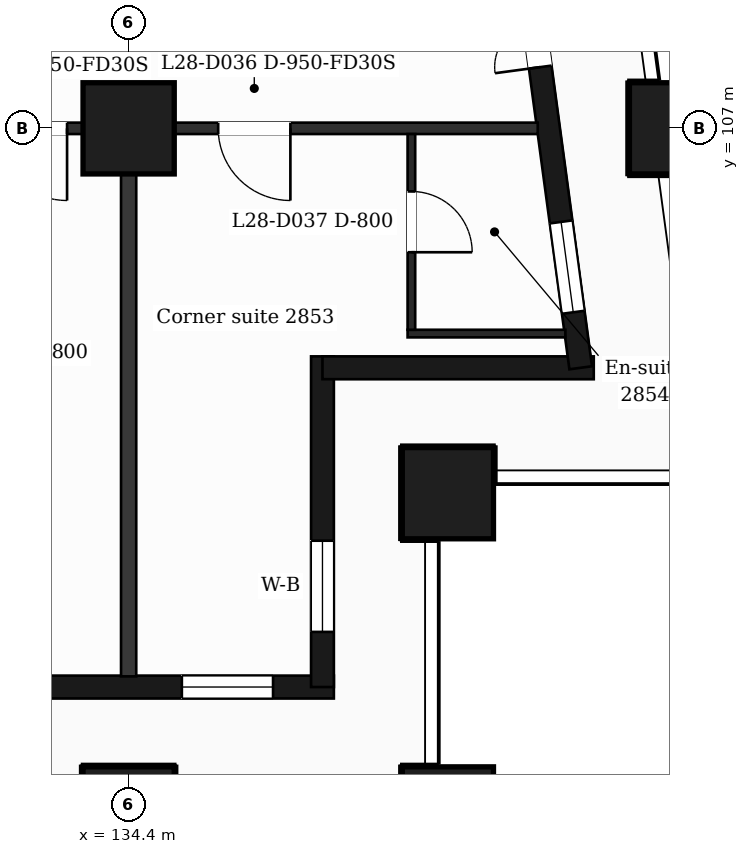
"""IFC4 building model, lengths in metres.
Left out: names, types, materials, properties, quantities, classifications, styles, units other than length and angle.
Written with IfcOpenShell. Run it as: python <this file> out.ifc"""

import sys

from ifc_helpers import new_model, si_unit, direction, frame, frame_2d, origin, origin_2d, place, context, subcontext, project, spatial, rectangle, extrude, element, fill, save


model = new_model("IFC4")
c1 = context("Model", 3, precision=1e-05, world=origin(), true_north=direction((0.0, 1.0)))
c2 = subcontext(c1, "Body", "Model", "MODEL_VIEW")
j1 = project(units=[si_unit("LENGTHUNIT", "METRE"), si_unit("PLANEANGLEUNIT", "RADIAN")], contexts=[c1])
p1 = place(None, origin())
s1 = spatial("IfcSite", under=j1, at=p1, CompositionType="ELEMENT")
p2 = place(p1, origin())
s2 = spatial("IfcBuilding", under=s1, at=p2, CompositionType="ELEMENT")
p3 = place(p2, frame((0.0, 0.0, 120.6)))
s3 = spatial("IfcBuildingStorey", under=s2, at=p3, CompositionType="ELEMENT", Elevation=120.6)
for number, where, z_axis, x_axis in (
    (1, (134.4, 98.0, 0.0), (0.0, 0.0, 1.0), (1.0, 0.0, 0.0)),
    (2, (138.6, 98.0, 0.0), (0.0, 0.0, 1.0), (1.0, 0.0, 0.0)),
    (3, (138.6, 102.2, 0.0), (0.0, 0.0, 1.0), (1.0, 0.0, 0.0)),
    (4, (134.4, 107.0, 0.0), (0.0, 0.0, 1.0), (1.0, 0.0, 0.0)),
    (5, (141.588, 107.0, 0.0), (0.0, 0.0, 1.0), (1.0, 0.0, 0.0)),
):
    element("IfcColumn", number, at=place(p3, frame(where, z_axis=z_axis, x_axis=x_axis)), inside=s3, PredefinedType="COLUMN", context=c2, shape_type="SweptSolid", body=[
        extrude(rectangle(XDim=1.2, YDim=1.2, at=origin_2d()), origin(), (0.0, 0.0, 1.0), 3.7),
    ])
p4 = place(p3, frame((89.85, 99.65, 0.0), z_axis=(0.0, 0.0, 1.0), x_axis=(1.0, 0.0, 0.0)))
e6 = element("IfcWall", 6, at=p4, inside=s3, PredefinedType="SOLIDWALL", context=c2, shape_type="SweptSolid", body=[
    extrude(rectangle(XDim=47.25, YDim=0.3, at=frame_2d((23.625, 0.0))), origin(), (0.0, 0.0, 1.0), 3.38),
])
p5 = place(p4, frame((0.725, 0.0, 0.9)))
e7 = element("IfcOpeningElement", 7, at=p5, cuts=e6, PredefinedType="OPENING", context=c2, shape_type="SweptSolid", body=[
    extrude(rectangle(XDim=1.2, YDim=2.1, at=frame_2d((0.6, 1.05))), frame((0.0, 0.16, 0.0), z_axis=(0.0, -1.0, 0.0), x_axis=(1.0, 0.0, 0.0)), (0.0, 0.0, 1.0), 0.32),
])
p6 = place(p4, frame((3.45, 0.0, 0.9)))
e8 = element("IfcOpeningElement", 8, at=p6, cuts=e6, PredefinedType="OPENING", context=c2, shape_type="SweptSolid", body=[
    extrude(rectangle(XDim=2.4, YDim=2.1, at=frame_2d((1.2, 1.05))), frame((0.0, 0.16, 0.0), z_axis=(0.0, -1.0, 0.0), x_axis=(1.0, 0.0, 0.0)), (0.0, 0.0, 1.0), 0.32),
])
p7 = place(p4, frame((7.65, 0.0, 0.9)))
e9 = element("IfcOpeningElement", 9, at=p7, cuts=e6, PredefinedType="OPENING", context=c2, shape_type="SweptSolid", body=[
    extrude(rectangle(XDim=2.4, YDim=2.1, at=frame_2d((1.2, 1.05))), frame((0.0, 0.16, 0.0), z_axis=(0.0, -1.0, 0.0), x_axis=(1.0, 0.0, 0.0)), (0.0, 0.0, 1.0), 0.32),
])
p8 = place(p4, frame((12.45, 0.0, 0.9)))
e10 = element("IfcOpeningElement", 10, at=p8, cuts=e6, PredefinedType="OPENING", context=c2, shape_type="SweptSolid", body=[
    extrude(rectangle(XDim=1.2, YDim=2.1, at=frame_2d((0.6, 1.05))), frame((0.0, 0.16, 0.0), z_axis=(0.0, -1.0, 0.0), x_axis=(1.0, 0.0, 0.0)), (0.0, 0.0, 1.0), 0.32),
])
p9 = place(p4, frame((16.65, 0.0, 0.9)))
e11 = element("IfcOpeningElement", 11, at=p9, cuts=e6, PredefinedType="OPENING", context=c2, shape_type="SweptSolid", body=[
    extrude(rectangle(XDim=1.2, YDim=2.1, at=frame_2d((0.6, 1.05))), frame((0.0, 0.16, 0.0), z_axis=(0.0, -1.0, 0.0), x_axis=(1.0, 0.0, 0.0)), (0.0, 0.0, 1.0), 0.32),
])
p10 = place(p4, frame((19.95, 0.0, 0.0)))
e12 = element("IfcOpeningElement", 12, at=p10, cuts=e6, PredefinedType="OPENING", context=c2, shape_type="SweptSolid", body=[
    extrude(rectangle(XDim=1.2, YDim=2.4, at=frame_2d((0.6, 1.2))), frame((0.0, 0.16, 0.0), z_axis=(0.0, -1.0, 0.0), x_axis=(1.0, 0.0, 0.0)), (0.0, 0.0, 1.0), 0.32),
])
p11 = place(p4, frame((21.75, 0.0, 0.9)))
e13 = element("IfcOpeningElement", 13, at=p11, cuts=e6, PredefinedType="OPENING", context=c2, shape_type="SweptSolid", body=[
    extrude(rectangle(XDim=1.2, YDim=2.1, at=frame_2d((0.6, 1.05))), frame((0.0, 0.16, 0.0), z_axis=(0.0, -1.0, 0.0), x_axis=(1.0, 0.0, 0.0)), (0.0, 0.0, 1.0), 0.32),
])
p12 = place(p4, frame((24.45, 0.0, 0.9)))
e14 = element("IfcOpeningElement", 14, at=p12, cuts=e6, PredefinedType="OPENING", context=c2, shape_type="SweptSolid", body=[
    extrude(rectangle(XDim=2.4, YDim=2.1, at=frame_2d((1.2, 1.05))), frame((0.0, 0.16, 0.0), z_axis=(0.0, -1.0, 0.0), x_axis=(1.0, 0.0, 0.0)), (0.0, 0.0, 1.0), 0.32),
])
p13 = place(p4, frame((28.35, 0.0, 0.0)))
e15 = element("IfcOpeningElement", 15, at=p13, cuts=e6, PredefinedType="OPENING", context=c2, shape_type="SweptSolid", body=[
    extrude(rectangle(XDim=1.2, YDim=2.4, at=frame_2d((0.6, 1.2))), frame((0.0, 0.16, 0.0), z_axis=(0.0, -1.0, 0.0), x_axis=(1.0, 0.0, 0.0)), (0.0, 0.0, 1.0), 0.32),
])
p14 = place(p4, frame((30.15, 0.0, 0.9)))
e16 = element("IfcOpeningElement", 16, at=p14, cuts=e6, PredefinedType="OPENING", context=c2, shape_type="SweptSolid", body=[
    extrude(rectangle(XDim=1.2, YDim=2.1, at=frame_2d((0.6, 1.05))), frame((0.0, 0.16, 0.0), z_axis=(0.0, -1.0, 0.0), x_axis=(1.0, 0.0, 0.0)), (0.0, 0.0, 1.0), 0.32),
])
p15 = place(p4, frame((32.85, 0.0, 0.9)))
e17 = element("IfcOpeningElement", 17, at=p15, cuts=e6, PredefinedType="OPENING", context=c2, shape_type="SweptSolid", body=[
    extrude(rectangle(XDim=2.4, YDim=2.1, at=frame_2d((1.2, 1.05))), frame((0.0, 0.16, 0.0), z_axis=(0.0, -1.0, 0.0), x_axis=(1.0, 0.0, 0.0)), (0.0, 0.0, 1.0), 0.32),
])
p16 = place(p4, frame((37.05, 0.0, 0.9)))
e18 = element("IfcOpeningElement", 18, at=p16, cuts=e6, PredefinedType="OPENING", context=c2, shape_type="SweptSolid", body=[
    extrude(rectangle(XDim=2.4, YDim=2.1, at=frame_2d((1.2, 1.05))), frame((0.0, 0.16, 0.0), z_axis=(0.0, -1.0, 0.0), x_axis=(1.0, 0.0, 0.0)), (0.0, 0.0, 1.0), 0.32),
])
p17 = place(p4, frame((41.85, 0.0, 0.9)))
e19 = element("IfcOpeningElement", 19, at=p17, cuts=e6, PredefinedType="OPENING", context=c2, shape_type="SweptSolid", body=[
    extrude(rectangle(XDim=1.2, YDim=2.1, at=frame_2d((0.6, 1.05))), frame((0.0, 0.16, 0.0), z_axis=(0.0, -1.0, 0.0), x_axis=(1.0, 0.0, 0.0)), (0.0, 0.0, 1.0), 0.32),
])
p18 = place(p4, frame((45.25, 0.0, 0.9)))
e20 = element("IfcOpeningElement", 20, at=p18, cuts=e6, PredefinedType="OPENING", context=c2, shape_type="SweptSolid", body=[
    extrude(rectangle(XDim=1.2, YDim=2.1, at=frame_2d((0.6, 1.05))), frame((0.0, 0.16, 0.0), z_axis=(0.0, -1.0, 0.0), x_axis=(1.0, 0.0, 0.0)), (0.0, 0.0, 1.0), 0.32),
])
p19 = place(p3, frame((136.95, 99.65, 0.0), z_axis=(0.0, 0.0, 1.0), x_axis=(0.0, 1.0, 0.0)))
e21 = element("IfcWall", 21, at=p19, inside=s3, PredefinedType="SOLIDWALL", context=c2, shape_type="SweptSolid", body=[
    extrude(rectangle(XDim=4.35, YDim=0.3, at=frame_2d((2.175, 0.0))), origin(), (0.0, 0.0, 1.0), 3.38),
])
p20 = place(p19, frame((0.725, 0.0, 0.9)))
e22 = element("IfcOpeningElement", 22, at=p20, cuts=e21, PredefinedType="OPENING", context=c2, shape_type="SweptSolid", body=[
    extrude(rectangle(XDim=1.2, YDim=2.1, at=frame_2d((0.6, 1.05))), frame((0.0, 0.16, 0.0), z_axis=(0.0, -1.0, 0.0), x_axis=(1.0, 0.0, 0.0)), (0.0, 0.0, 1.0), 0.32),
])
p21 = place(p3, frame((136.95, 103.85, 0.0), z_axis=(0.0, 0.0, 1.0), x_axis=(1.0, 0.0, 0.0)))
e23 = element("IfcWall", 23, at=p21, inside=s3, PredefinedType="SOLIDWALL", context=c2, shape_type="SweptSolid", body=[
    extrude(rectangle(XDim=3.569, YDim=0.3, at=frame_2d((1.785, 0.0))), origin(), (0.0, 0.0, 1.0), 3.38),
])
p22 = place(p3, frame((140.348, 103.85, 0.0), z_axis=(0.0, 0.0, 1.0), x_axis=(-0.133431549479, 0.991058031401, 0.0)))
e24 = element("IfcWall", 24, at=p22, inside=s3, PredefinedType="SOLIDWALL", context=c2, shape_type="SweptSolid", body=[
    extrude(rectangle(XDim=6.609, YDim=0.3, at=frame_2d((3.304, 0.0))), origin(), (0.0, 0.0, 1.0), 3.38),
])
p23 = place(p22, frame((0.737, 0.0, 0.9)))
e25 = element("IfcOpeningElement", 25, at=p23, cuts=e24, PredefinedType="OPENING", context=c2, shape_type="SweptSolid", body=[
    extrude(rectangle(XDim=1.2, YDim=2.1, at=frame_2d((0.6, 1.05))), frame((0.0, 0.16, 0.0), z_axis=(0.0, -1.0, 0.0), x_axis=(1.0, 0.0, 0.0)), (0.0, 0.0, 1.0), 0.32),
])
p24 = place(p22, frame((3.991, 0.0, 0.0)))
e26 = element("IfcOpeningElement", 26, at=p24, cuts=e24, PredefinedType="OPENING", context=c2, shape_type="SweptSolid", body=[
    extrude(rectangle(XDim=1.2, YDim=2.4, at=frame_2d((0.6, 1.2))), frame((0.0, 0.16, 0.0), z_axis=(0.0, -1.0, 0.0), x_axis=(1.0, 0.0, 0.0)), (0.0, 0.0, 1.0), 0.32),
])
p25 = place(p3, frame((138.07, 104.3, 0.0), z_axis=(0.0, 0.0, 1.0), x_axis=(1.0, 0.0, 0.0)))
e27 = element("IfcWall", 27, at=p25, inside=s3, PredefinedType="PARTITIONING", context=c2, shape_type="SweptSolid", body=[
    extrude(rectangle(XDim=2.076, YDim=0.1, at=frame_2d((1.038, 0.0))), origin(), (0.0, 0.0, 1.0), 3.38),
])
p26 = place(p3, frame((87.018, 107.0, 0.0), z_axis=(0.0, 0.0, 1.0), x_axis=(1.0, 0.0, 0.0)))
e28 = element("IfcWall", 28, at=p26, inside=s3, PredefinedType="PARTITIONING", context=c2, shape_type="SweptSolid", body=[
    extrude(rectangle(XDim=52.765, YDim=0.15, at=frame_2d((26.382, 0.0))), origin(), (0.0, 0.0, 1.0), 3.38),
])
p27 = place(p26, frame((1.276, 0.0, 0.0)))
e29 = element("IfcOpeningElement", 29, at=p27, cuts=e28, PredefinedType="OPENING", context=c2, shape_type="SweptSolid", body=[
    extrude(rectangle(XDim=0.95, YDim=2.1, at=frame_2d((0.475, 1.05))), frame((0.0, 0.085, 0.0), z_axis=(0.0, -1.0, 0.0), x_axis=(1.0, 0.0, 0.0)), (0.0, 0.0, 1.0), 0.17),
])
p28 = place(p26, frame((6.192, 0.0, 0.0)))
e30 = element("IfcOpeningElement", 30, at=p28, cuts=e28, PredefinedType="OPENING", context=c2, shape_type="SweptSolid", body=[
    extrude(rectangle(XDim=0.95, YDim=2.1, at=frame_2d((0.475, 1.05))), frame((0.0, 0.085, 0.0), z_axis=(0.0, -1.0, 0.0), x_axis=(1.0, 0.0, 0.0)), (0.0, 0.0, 1.0), 0.17),
])
p29 = place(p26, frame((11.982, 0.0, 0.0)))
e31 = element("IfcOpeningElement", 31, at=p29, cuts=e28, PredefinedType="OPENING", context=c2, shape_type="SweptSolid", body=[
    extrude(rectangle(XDim=1.0, YDim=2.1, at=frame_2d((0.5, 1.05))), frame((0.0, 0.085, 0.0), z_axis=(0.0, -1.0, 0.0), x_axis=(1.0, 0.0, 0.0)), (0.0, 0.0, 1.0), 0.17),
])
p30 = place(p26, frame((14.582, 0.0, 0.0)))
e32 = element("IfcOpeningElement", 32, at=p30, cuts=e28, PredefinedType="OPENING", context=c2, shape_type="SweptSolid", body=[
    extrude(rectangle(XDim=0.95, YDim=2.1, at=frame_2d((0.475, 1.05))), frame((0.0, 0.085, 0.0), z_axis=(0.0, -1.0, 0.0), x_axis=(1.0, 0.0, 0.0)), (0.0, 0.0, 1.0), 0.17),
])
p31 = place(p26, frame((18.257, 0.0, 0.0)))
e33 = element("IfcOpeningElement", 33, at=p31, cuts=e28, PredefinedType="OPENING", context=c2, shape_type="SweptSolid", body=[
    extrude(rectangle(XDim=0.95, YDim=2.1, at=frame_2d((0.475, 1.05))), frame((0.0, 0.085, 0.0), z_axis=(0.0, -1.0, 0.0), x_axis=(1.0, 0.0, 0.0)), (0.0, 0.0, 1.0), 0.17),
])
p32 = place(p26, frame((22.992, 0.0, 0.0)))
e34 = element("IfcOpeningElement", 34, at=p32, cuts=e28, PredefinedType="OPENING", context=c2, shape_type="SweptSolid", body=[
    extrude(rectangle(XDim=0.95, YDim=2.1, at=frame_2d((0.475, 1.05))), frame((0.0, 0.085, 0.0), z_axis=(0.0, -1.0, 0.0), x_axis=(1.0, 0.0, 0.0)), (0.0, 0.0, 1.0), 0.17),
])
p33 = place(p26, frame((26.632, 0.0, 0.0)))
e35 = element("IfcOpeningElement", 35, at=p33, cuts=e28, PredefinedType="OPENING", context=c2, shape_type="SweptSolid", body=[
    extrude(rectangle(XDim=1.0, YDim=2.1, at=frame_2d((0.5, 1.05))), frame((0.0, 0.085, 0.0), z_axis=(0.0, -1.0, 0.0), x_axis=(1.0, 0.0, 0.0)), (0.0, 0.0, 1.0), 0.17),
])
p34 = place(p26, frame((33.557, 0.0, 0.0)))
e36 = element("IfcOpeningElement", 36, at=p34, cuts=e28, PredefinedType="OPENING", context=c2, shape_type="SweptSolid", body=[
    extrude(rectangle(XDim=0.95, YDim=2.1, at=frame_2d((0.475, 1.05))), frame((0.0, 0.085, 0.0), z_axis=(0.0, -1.0, 0.0), x_axis=(1.0, 0.0, 0.0)), (0.0, 0.0, 1.0), 0.17),
])
p35 = place(p26, frame((37.182, 0.0, 0.0)))
e37 = element("IfcOpeningElement", 37, at=p35, cuts=e28, PredefinedType="OPENING", context=c2, shape_type="SweptSolid", body=[
    extrude(rectangle(XDim=0.95, YDim=2.1, at=frame_2d((0.475, 1.05))), frame((0.0, 0.085, 0.0), z_axis=(0.0, -1.0, 0.0), x_axis=(1.0, 0.0, 0.0)), (0.0, 0.0, 1.0), 0.17),
])
p36 = place(p26, frame((41.957, 0.0, 0.0)))
e38 = element("IfcOpeningElement", 38, at=p36, cuts=e28, PredefinedType="OPENING", context=c2, shape_type="SweptSolid", body=[
    extrude(rectangle(XDim=0.95, YDim=2.1, at=frame_2d((0.475, 1.05))), frame((0.0, 0.085, 0.0), z_axis=(0.0, -1.0, 0.0), x_axis=(1.0, 0.0, 0.0)), (0.0, 0.0, 1.0), 0.17),
])
p37 = place(p26, frame((45.622, 0.0, 0.0)))
e39 = element("IfcOpeningElement", 39, at=p37, cuts=e28, PredefinedType="OPENING", context=c2, shape_type="SweptSolid", body=[
    extrude(rectangle(XDim=0.95, YDim=2.1, at=frame_2d((0.475, 1.05))), frame((0.0, 0.085, 0.0), z_axis=(0.0, -1.0, 0.0), x_axis=(1.0, 0.0, 0.0)), (0.0, 0.0, 1.0), 0.17),
])
p38 = place(p26, frame((48.56, 0.0, 0.0)))
e40 = element("IfcOpeningElement", 40, at=p38, cuts=e28, PredefinedType="OPENING", context=c2, shape_type="SweptSolid", body=[
    extrude(rectangle(XDim=0.95, YDim=2.1, at=frame_2d((0.475, 1.05))), frame((0.0, 0.085, 0.0), z_axis=(0.0, -1.0, 0.0), x_axis=(1.0, 0.0, 0.0)), (0.0, 0.0, 1.0), 0.17),
])
p39 = place(p3, frame((134.4, 99.79, 0.0), z_axis=(0.0, 0.0, 1.0), x_axis=(0.0, 1.0, 0.0)))
e41 = element("IfcWall", 41, at=p39, inside=s3, PredefinedType="PARTITIONING", context=c2, shape_type="SweptSolid", body=[
    extrude(rectangle(XDim=7.135, YDim=0.2, at=frame_2d((3.567, 0.0))), origin(), (0.0, 0.0, 1.0), 3.38),
])
p40 = place(p3, frame((138.12, 104.35, 0.0), z_axis=(0.0, 0.0, 1.0), x_axis=(0.0, 1.0, 0.0)))
e42 = element("IfcWall", 42, at=p40, inside=s3, PredefinedType="PARTITIONING", context=c2, shape_type="SweptSolid", body=[
    extrude(rectangle(XDim=2.575, YDim=0.1, at=frame_2d((1.288, 0.0))), origin(), (0.0, 0.0, 1.0), 3.38),
])
p41 = place(p40, frame((1.02, 0.0, 0.0)))
e43 = element("IfcOpeningElement", 43, at=p41, cuts=e42, PredefinedType="OPENING", context=c2, shape_type="SweptSolid", body=[
    extrude(rectangle(XDim=0.8, YDim=2.1, at=frame_2d((0.4, 1.05))), frame((0.0, 0.06, 0.0), z_axis=(0.0, -1.0, 0.0), x_axis=(1.0, 0.0, 0.0)), (0.0, 0.0, 1.0), 0.12),
])
p42 = place(p18, origin())
e44 = element("IfcWindow", 44, at=p42, inside=s3, PartitioningType="SINGLE_PANEL", PredefinedType="WINDOW", context=c2, shape_type="SweptSolid", body=[
    extrude(rectangle(XDim=1.2, YDim=2.1, at=frame_2d((0.6, 1.05))), frame((0.0, 0.03, 0.0), z_axis=(0.0, -1.0, 0.0), x_axis=(1.0, 0.0, 0.0)), (0.0, 0.0, 1.0), 0.06),
])
fill(e20, e44)
p43 = place(p20, origin())
e45 = element("IfcWindow", 45, at=p43, inside=s3, PartitioningType="SINGLE_PANEL", PredefinedType="WINDOW", context=c2, shape_type="SweptSolid", body=[
    extrude(rectangle(XDim=1.2, YDim=2.1, at=frame_2d((0.6, 1.05))), frame((0.0, 0.03, 0.0), z_axis=(0.0, -1.0, 0.0), x_axis=(1.0, 0.0, 0.0)), (0.0, 0.0, 1.0), 0.06),
])
fill(e22, e45)
p44 = place(p23, origin())
e46 = element("IfcWindow", 46, at=p44, inside=s3, PartitioningType="SINGLE_PANEL", PredefinedType="WINDOW", context=c2, shape_type="SweptSolid", body=[
    extrude(rectangle(XDim=1.2, YDim=2.1, at=frame_2d((0.6, 1.05))), frame((0.0, 0.03, 0.0), z_axis=(0.0, -1.0, 0.0), x_axis=(1.0, 0.0, 0.0)), (0.0, 0.0, 1.0), 0.06),
])
fill(e25, e46)
p45 = place(p24, origin())
e47 = element("IfcDoor", 47, at=p45, inside=s3, OperationType="DOUBLE_DOOR_SINGLE_SWING", PredefinedType="DOOR", context=c2, shape_type="SweptSolid", body=[
    extrude(rectangle(XDim=1.2, YDim=2.4, at=frame_2d((0.6, 1.2))), frame((0.0, 0.025, 0.0), z_axis=(0.0, -1.0, 0.0), x_axis=(1.0, 0.0, 0.0)), (0.0, 0.0, 1.0), 0.05),
])
fill(e26, e47)
p46 = place(p37, origin())
e48 = element("IfcDoor", 48, at=p46, inside=s3, OperationType="SINGLE_SWING_RIGHT", PredefinedType="DOOR", context=c2, shape_type="SweptSolid", body=[
    extrude(rectangle(XDim=0.95, YDim=2.1, at=frame_2d((0.475, 1.05))), frame((0.0, 0.025, 0.0), z_axis=(0.0, -1.0, 0.0), x_axis=(1.0, 0.0, 0.0)), (0.0, 0.0, 1.0), 0.05),
])
fill(e39, e48)
p47 = place(p38, origin())
e49 = element("IfcDoor", 49, at=p47, inside=s3, OperationType="SINGLE_SWING_RIGHT", PredefinedType="DOOR", context=c2, shape_type="SweptSolid", body=[
    extrude(rectangle(XDim=0.95, YDim=2.1, at=frame_2d((0.475, 1.05))), frame((0.0, 0.025, 0.0), z_axis=(0.0, -1.0, 0.0), x_axis=(1.0, 0.0, 0.0)), (0.0, 0.0, 1.0), 0.05),
])
fill(e40, e49)
p48 = place(p41, origin())
e50 = element("IfcDoor", 50, at=p48, inside=s3, OperationType="SINGLE_SWING_LEFT", PredefinedType="DOOR", context=c2, shape_type="SweptSolid", body=[
    extrude(rectangle(XDim=0.8, YDim=2.1, at=frame_2d((0.4, 1.05))), frame((0.0, 0.025, 0.0), z_axis=(0.0, -1.0, 0.0), x_axis=(1.0, 0.0, 0.0)), (0.0, 0.0, 1.0), 0.05),
])
fill(e43, e50)
save(model, sys.argv[1])
